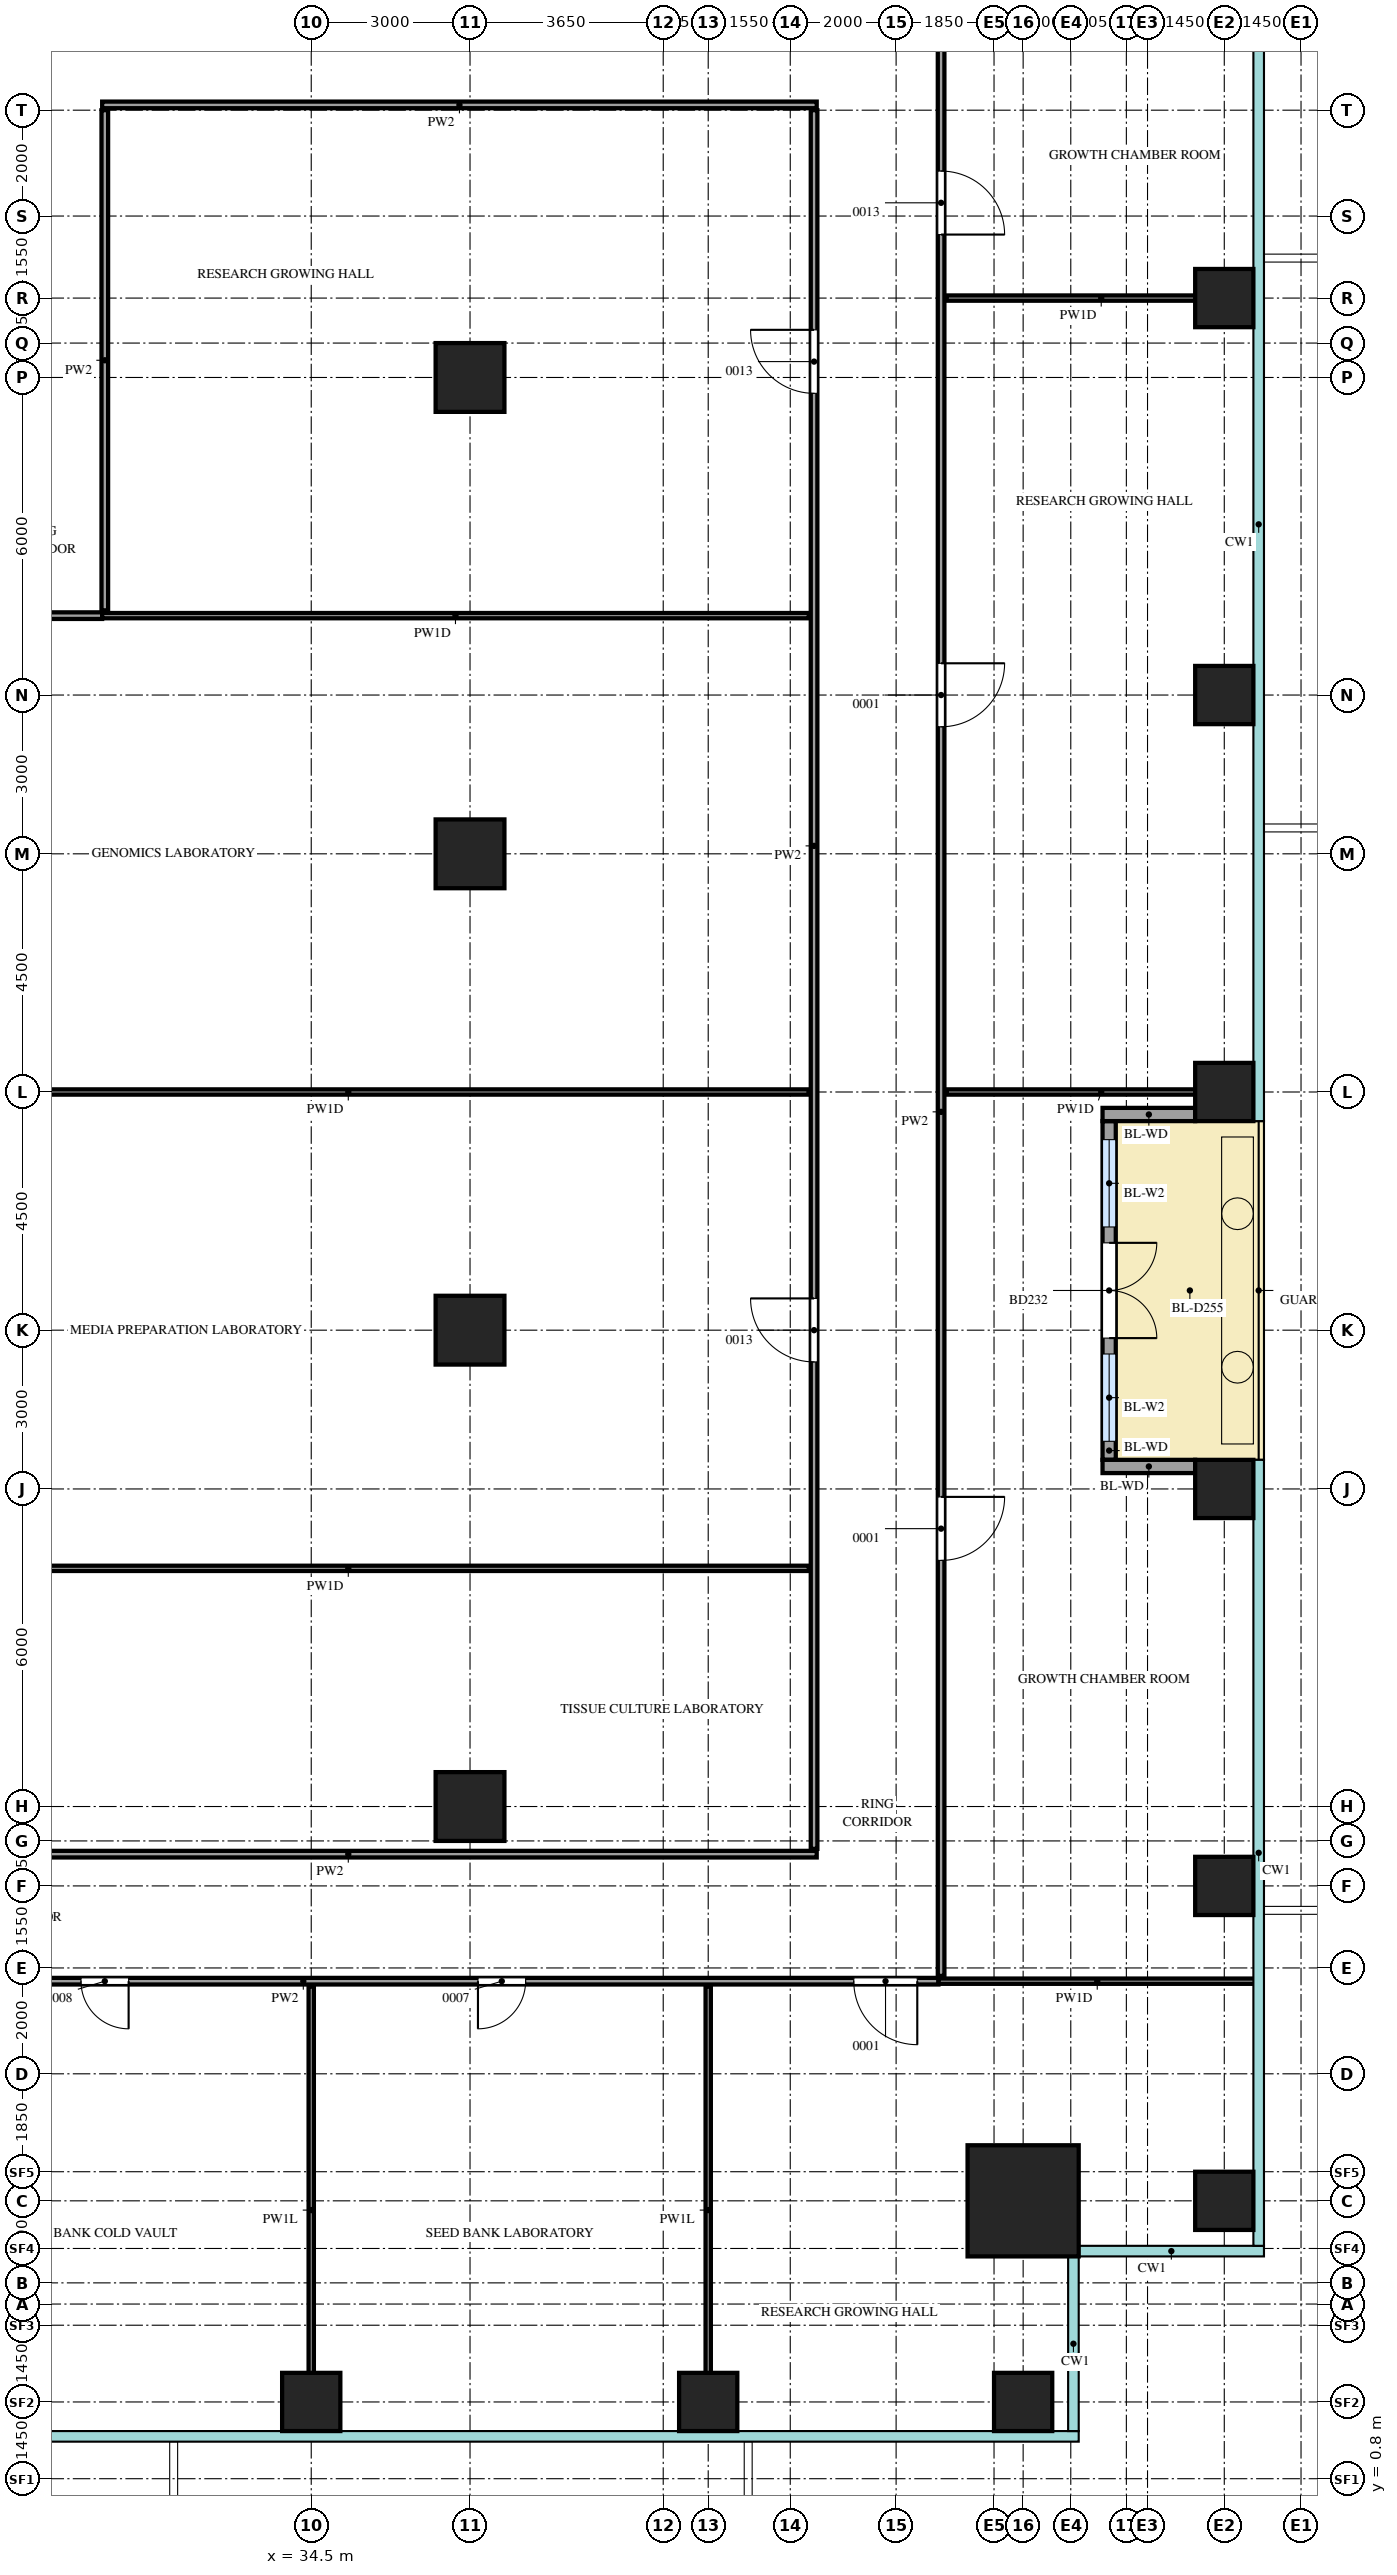
"""IFC4 building model, lengths in metres.
Left out: names, types, materials, properties, quantities, classifications, styles, units other than length and angle.
Written with IfcOpenShell. Run it as: python <this file> out.ifc"""

import sys

from ifc_helpers import new_model, si_unit, direction, frame, frame_2d, origin, origin_2d, place, context, subcontext, project, spatial, rectangle, extrude, source, transform, mapped, element, fill, save


model = new_model("IFC4")
c1 = context("Model", 3, precision=1e-05, world=origin(), true_north=direction((0.0, 1.0)))
c2 = subcontext(c1, "Body", "Model", "MODEL_VIEW")
j1 = project(units=[si_unit("LENGTHUNIT", "METRE"), si_unit("PLANEANGLEUNIT", "RADIAN")], contexts=[c1])
p1 = place(None, origin())
s1 = spatial("IfcSite", under=j1, at=p1, CompositionType="ELEMENT")
p2 = place(p1, origin())
s2 = spatial("IfcBuilding", under=s1, at=p2, CompositionType="ELEMENT")
p3 = place(p2, frame((0.0, 0.0, 110.3)))
s3 = spatial("IfcBuildingStorey", under=s2, at=p3, CompositionType="ELEMENT", Elevation=110.3)
m1 = source(origin(), c2, "Body", "SweptSolid", [
    extrude(rectangle(XDim=2.1, YDim=2.1, at=origin_2d()), origin(), (0.0, 0.0, 1.0), 4.4),
])
p4 = place(p3, frame((47.95, 6.05, 0.0), z_axis=(0.0, 0.0, 1.0), x_axis=(1.0, 0.0, 0.0)))
e1 = element("IfcColumn", 1, at=p4, inside=s3, PredefinedType="COLUMN", context=c2, shape_type="MappedRepresentation", body=[
    mapped(m1, transform((0.0, 0.0, 0.0))),
])
m2 = source(origin(), c2, "Body", "SweptSolid", [
    extrude(rectangle(XDim=1.1, YDim=1.1, at=origin_2d()), origin(), (0.0, 0.0, 1.0), 4.1),
])
for number, where, z_axis, x_axis in (
    (2, (34.5, 2.25, 0.0), (0.0, 0.0, 1.0), (1.0, 0.0, 0.0)),
    (3, (42.0, 2.25, 0.0), (0.0, 0.0, 1.0), (1.0, 0.0, 0.0)),
    (4, (47.95, 2.25, 0.0), (0.0, 0.0, 1.0), (1.0, 0.0, 0.0)),
    (5, (51.75, 6.05, 0.0), (0.0, 0.0, 1.0), (1.0, 0.0, 0.0)),
    (6, (51.75, 12.0, 0.0), (0.0, 0.0, 1.0), (1.0, 0.0, 0.0)),
    (7, (51.75, 19.5, 0.0), (0.0, 0.0, 1.0), (1.0, 0.0, 0.0)),
    (8, (51.75, 27.0, 0.0), (0.0, 0.0, 1.0), (1.0, 0.0, 0.0)),
    (9, (51.75, 34.5, 0.0), (0.0, 0.0, 1.0), (1.0, 0.0, 0.0)),
    (10, (51.75, 42.0, 0.0), (0.0, 0.0, 1.0), (1.0, 0.0, 0.0)),
):
    element("IfcColumn", number, at=place(p3, frame(where, z_axis=z_axis, x_axis=x_axis)), inside=s3, PredefinedType="COLUMN", context=c2, shape_type="MappedRepresentation", body=[
        mapped(m2, transform((0.0, 0.0, 0.0))),
    ])
m3 = source(origin(), c2, "Body", "SweptSolid", [
    extrude(rectangle(XDim=1.3, YDim=1.3, at=origin_2d()), origin(), (0.0, 0.0, 1.0), 4.1),
])
for number, where, z_axis, x_axis in (
    (11, (37.5, 13.5, 0.0), (0.0, 0.0, 1.0), (1.0, 0.0, 0.0)),
    (12, (37.5, 22.5, 0.0), (0.0, 0.0, 1.0), (1.0, 0.0, 0.0)),
    (13, (37.5, 31.5, 0.0), (0.0, 0.0, 1.0), (1.0, 0.0, 0.0)),
    (14, (37.5, 40.5, 0.0), (0.0, 0.0, 1.0), (1.0, 0.0, 0.0)),
):
    element("IfcColumn", number, at=place(p3, frame(where, z_axis=z_axis, x_axis=x_axis)), inside=s3, PredefinedType="COLUMN", context=c2, shape_type="MappedRepresentation", body=[
        mapped(m3, transform((0.0, 0.0, 0.0))),
    ])
m4 = source(origin(), c2, "Body", "SweptSolid", [
    extrude(rectangle(XDim=6.4, YDim=0.25, at=frame_2d((3.2, 0.0))), origin(), (0.0, 0.0, 1.0), 3.55),
])
p5 = place(p3, frame((49.575, 20.05, 0.0), z_axis=(0.0, 0.0, 1.0), x_axis=(0.0, 1.0, 0.0)))
e15 = element("IfcWall", 15, at=p5, inside=s3, PredefinedType="SOLIDWALL", context=c2, shape_type="MappedRepresentation", body=[
    mapped(m4, transform((0.0, 0.0, 0.0))),
])
m5 = source(origin(), c2, "Body", "SweptSolid", [
    extrude(rectangle(XDim=1.65, YDim=2.4, at=frame_2d((0.825, 1.2))), frame((0.0, 0.135, 0.0), z_axis=(0.0, -1.0, 0.0), x_axis=(1.0, 0.0, 0.0)), (0.0, 0.0, 1.0), 0.27),
])
p6 = place(p5, frame((0.35, 0.0, 0.0)))
e16 = element("IfcOpeningElement", 16, at=p6, cuts=e15, PredefinedType="OPENING", context=c2, shape_type="MappedRepresentation", body=[
    mapped(m5, transform((0.0, 0.0, 0.0))),
])
p7 = place(p5, frame((4.4, 0.0, 0.0)))
e17 = element("IfcOpeningElement", 17, at=p7, cuts=e15, PredefinedType="OPENING", context=c2, shape_type="MappedRepresentation", body=[
    mapped(m5, transform((0.0, 0.0, 0.0))),
])
m6 = source(origin(), c2, "Body", "SweptSolid", [
    extrude(rectangle(XDim=1.8, YDim=2.4, at=frame_2d((0.9, 1.2))), frame((0.0, 0.135, 0.0), z_axis=(0.0, -1.0, 0.0), x_axis=(1.0, 0.0, 0.0)), (0.0, 0.0, 1.0), 0.27),
])
p8 = place(p5, frame((2.3, 0.0, 0.0)))
e18 = element("IfcOpeningElement", 18, at=p8, cuts=e15, PredefinedType="OPENING", context=c2, shape_type="MappedRepresentation", body=[
    mapped(m6, transform((0.0, 0.0, 0.0))),
])
m7 = source(origin(), c2, "Body", "SweptSolid", [
    extrude(rectangle(XDim=1.75, YDim=0.25, at=frame_2d((0.875, 0.0))), origin(), (0.0, 0.0, 1.0), 3.55),
])
for number, where, z_axis, x_axis in (
    (19, (51.2, 19.925, 0.0), (0.0, 0.0, 1.0), (-1.0, 0.0, 0.0)),
    (20, (51.2, 26.575, 0.0), (0.0, 0.0, 1.0), (-1.0, 0.0, 0.0)),
):
    element("IfcWall", number, at=place(p3, frame(where, z_axis=z_axis, x_axis=x_axis)), inside=s3, PredefinedType="SOLIDWALL", context=c2, shape_type="MappedRepresentation", body=[
        mapped(m7, transform((0.0, 0.0, 0.0))),
    ])
m8 = source(origin(), c2, "Body", "SweptSolid", [
    extrude(rectangle(XDim=8.45, YDim=0.1, at=frame_2d((4.225, 0.0))), origin(), (0.0, 0.0, 1.0), 3.6),
])
for number, where, z_axis, x_axis in (
    (21, (34.5, 1.65, 0.0), (0.0, 0.0, 1.0), (0.0, 1.0, 0.0)),
    (22, (42.0, 1.65, 0.0), (0.0, 0.0, 1.0), (0.0, 1.0, 0.0)),
):
    element("IfcWall", number, at=place(p3, frame(where, z_axis=z_axis, x_axis=x_axis)), inside=s3, PredefinedType="PARTITIONING", context=c2, shape_type="MappedRepresentation", body=[
        mapped(m8, transform((0.0, 0.0, 0.0))),
    ])
m9 = source(origin(), c2, "Body", "SweptSolid", [
    extrude(rectangle(XDim=20.0, YDim=0.125, at=frame_2d((10.0, 0.0))), origin(), (0.0, 0.0, 1.0), 4.2),
])
p9 = place(p3, frame((26.35, 10.2, 0.0), z_axis=(0.0, 0.0, 1.0), x_axis=(1.0, 0.0, 0.0)))
e23 = element("IfcWall", 23, at=p9, inside=s3, PredefinedType="PARTITIONING", context=c2, shape_type="MappedRepresentation", body=[
    mapped(m9, transform((0.0, 0.0, 0.0))),
])
m10 = source(origin(), c2, "Body", "SweptSolid", [
    extrude(rectangle(XDim=0.9, YDim=2.1, at=frame_2d((0.45, 1.05))), frame((0.0, 0.073, 0.0), z_axis=(0.0, -1.0, 0.0), x_axis=(1.0, 0.0, 0.0)), (0.0, 0.0, 1.0), 0.145),
])
p10 = place(p9, frame((3.8, 0.0, 0.0)))
e24 = element("IfcOpeningElement", 24, at=p10, cuts=e23, PredefinedType="OPENING", context=c2, shape_type="MappedRepresentation", body=[
    mapped(m10, transform((0.0, 0.0, 0.0))),
])
p11 = place(p9, frame((11.3, 0.0, 0.0)))
e25 = element("IfcOpeningElement", 25, at=p11, cuts=e23, PredefinedType="OPENING", context=c2, shape_type="MappedRepresentation", body=[
    mapped(m10, transform((0.0, 0.0, 0.0))),
])
m11 = source(origin(), c2, "Body", "SweptSolid", [
    extrude(rectangle(XDim=1.2, YDim=2.1, at=frame_2d((0.6, 1.05))), frame((0.0, 0.073, 0.0), z_axis=(0.0, -1.0, 0.0), x_axis=(1.0, 0.0, 0.0)), (0.0, 0.0, 1.0), 0.145),
])
p12 = place(p9, frame((18.4, 0.0, 0.0)))
e26 = element("IfcOpeningElement", 26, at=p12, cuts=e23, PredefinedType="OPENING", context=c2, shape_type="MappedRepresentation", body=[
    mapped(m11, transform((0.0, 0.0, 0.0))),
])
m12 = source(origin(), c2, "Body", "SweptSolid", [
    extrude(rectangle(XDim=6.0, YDim=0.1, at=frame_2d((3.0, 0.0))), origin(), (0.0, 0.0, 1.0), 4.2),
])
p13 = place(p3, frame((46.35, 10.2, 0.0), z_axis=(0.0, 0.0, 1.0), x_axis=(1.0, 0.0, 0.0)))
e27 = element("IfcWall", 27, at=p13, inside=s3, PredefinedType="PARTITIONING", context=c2, shape_type="MappedRepresentation", body=[
    mapped(m12, transform((0.0, 0.0, 0.0))),
])
m13 = source(origin(), c2, "Body", "SweptSolid", [
    extrude(rectangle(XDim=37.65, YDim=0.125, at=frame_2d((18.825, 0.0))), origin(), (0.0, 0.0, 1.0), 4.2),
])
p14 = place(p3, frame((46.4, 10.3, 0.0), z_axis=(0.0, 0.0, 1.0), x_axis=(0.0, 1.0, 0.0)))
e28 = element("IfcWall", 28, at=p14, inside=s3, PredefinedType="PARTITIONING", context=c2, shape_type="MappedRepresentation", body=[
    mapped(m13, transform((0.0, 0.0, 0.0))),
])
p15 = place(p14, frame((7.85, 0.0, 0.0)))
e29 = element("IfcOpeningElement", 29, at=p15, cuts=e28, PredefinedType="OPENING", context=c2, shape_type="MappedRepresentation", body=[
    mapped(m11, transform((0.0, 0.0, 0.0))),
])
p16 = place(p14, frame((23.6, 0.0, 0.0)))
e30 = element("IfcOpeningElement", 30, at=p16, cuts=e28, PredefinedType="OPENING", context=c2, shape_type="MappedRepresentation", body=[
    mapped(m11, transform((0.0, 0.0, 0.0))),
])
p17 = place(p14, frame((32.9, 0.0, 0.0)))
e31 = element("IfcOpeningElement", 31, at=p17, cuts=e28, PredefinedType="OPENING", context=c2, shape_type="MappedRepresentation", body=[
    mapped(m11, transform((0.0, 0.0, 0.0))),
])
m14 = source(origin(), c2, "Body", "SweptSolid", [
    extrude(rectangle(XDim=17.7, YDim=0.125, at=frame_2d((8.85, 0.0))), origin(), (0.0, 0.0, 1.0), 4.2),
])
p18 = place(p3, frame((26.35, 12.6, 0.0), z_axis=(0.0, 0.0, 1.0), x_axis=(1.0, 0.0, 0.0)))
e32 = element("IfcWall", 32, at=p18, inside=s3, PredefinedType="PARTITIONING", context=c2, shape_type="MappedRepresentation", body=[
    mapped(m14, transform((0.0, 0.0, 0.0))),
])
m15 = source(origin(), c2, "Body", "SweptSolid", [
    extrude(rectangle(XDim=32.85, YDim=0.125, at=frame_2d((16.425, 0.0))), origin(), (0.0, 0.0, 1.0), 4.2),
])
p19 = place(p3, frame((44.0, 12.7, 0.0), z_axis=(0.0, 0.0, 1.0), x_axis=(0.0, 1.0, 0.0)))
e33 = element("IfcWall", 33, at=p19, inside=s3, PredefinedType="PARTITIONING", context=c2, shape_type="MappedRepresentation", body=[
    mapped(m15, transform((0.0, 0.0, 0.0))),
])
p20 = place(p19, frame((9.2, 0.0, 0.0)))
e34 = element("IfcOpeningElement", 34, at=p20, cuts=e33, PredefinedType="OPENING", context=c2, shape_type="MappedRepresentation", body=[
    mapped(m11, transform((0.0, 0.0, 0.0))),
])
p21 = place(p19, frame((27.5, 0.0, 0.0)))
e35 = element("IfcOpeningElement", 35, at=p21, cuts=e33, PredefinedType="OPENING", context=c2, shape_type="MappedRepresentation", body=[
    mapped(m11, transform((0.0, 0.0, 0.0))),
])
m16 = source(origin(), c2, "Body", "SweptSolid", [
    extrude(rectangle(XDim=17.4, YDim=0.1, at=frame_2d((8.7, 0.0))), origin(), (0.0, 0.0, 1.0), 4.2),
])
for number, where, z_axis, x_axis in (
    (36, (26.5, 18.0, 0.0), (0.0, 0.0, 1.0), (1.0, 0.0, 0.0)),
    (37, (26.5, 27.0, 0.0), (0.0, 0.0, 1.0), (1.0, 0.0, 0.0)),
):
    element("IfcWall", number, at=place(p3, frame(where, z_axis=z_axis, x_axis=x_axis)), inside=s3, PredefinedType="PARTITIONING", context=c2, shape_type="MappedRepresentation", body=[
        mapped(m16, transform((0.0, 0.0, 0.0))),
    ])
m17 = source(origin(), c2, "Body", "SweptSolid", [
    extrude(rectangle(XDim=5.85, YDim=0.1, at=frame_2d((2.925, 0.0))), origin(), (0.0, 0.0, 1.0), 4.2),
])
p22 = place(p3, frame((46.5, 27.0, 0.0), z_axis=(0.0, 0.0, 1.0), x_axis=(1.0, 0.0, 0.0)))
e38 = element("IfcWall", 38, at=p22, inside=s3, PredefinedType="PARTITIONING", context=c2, shape_type="MappedRepresentation", body=[
    mapped(m17, transform((0.0, 0.0, 0.0))),
])
m18 = source(origin(), c2, "Body", "SweptSolid", [
    extrude(rectangle(XDim=4.2, YDim=0.125, at=frame_2d((2.1, 0.0))), origin(), (0.0, 0.0, 1.0), 4.2),
])
p23 = place(p3, frame((26.35, 36.0, 0.0), z_axis=(0.0, 0.0, 1.0), x_axis=(1.0, 0.0, 0.0)))
e39 = element("IfcWall", 39, at=p23, inside=s3, PredefinedType="PARTITIONING", context=c2, shape_type="MappedRepresentation", body=[
    mapped(m18, transform((0.0, 0.0, 0.0))),
])
m19 = source(origin(), c2, "Body", "SweptSolid", [
    extrude(rectangle(XDim=13.35, YDim=0.1, at=frame_2d((6.675, 0.0))), origin(), (0.0, 0.0, 1.0), 4.2),
])
p24 = place(p3, frame((30.55, 36.0, 0.0), z_axis=(0.0, 0.0, 1.0), x_axis=(1.0, 0.0, 0.0)))
e40 = element("IfcWall", 40, at=p24, inside=s3, PredefinedType="PARTITIONING", context=c2, shape_type="MappedRepresentation", body=[
    mapped(m19, transform((0.0, 0.0, 0.0))),
])
m20 = source(origin(), c2, "Body", "SweptSolid", [
    extrude(rectangle(XDim=9.45, YDim=0.125, at=frame_2d((4.725, 0.0))), origin(), (0.0, 0.0, 1.0), 4.2),
])
p25 = place(p3, frame((30.6, 36.1, 0.0), z_axis=(0.0, 0.0, 1.0), x_axis=(0.0, 1.0, 0.0)))
e41 = element("IfcWall", 41, at=p25, inside=s3, PredefinedType="PARTITIONING", context=c2, shape_type="MappedRepresentation", body=[
    mapped(m20, transform((0.0, 0.0, 0.0))),
])
p26 = place(p3, frame((46.5, 42.0, 0.0), z_axis=(0.0, 0.0, 1.0), x_axis=(1.0, 0.0, 0.0)))
e42 = element("IfcWall", 42, at=p26, inside=s3, PredefinedType="PARTITIONING", context=c2, shape_type="MappedRepresentation", body=[
    mapped(m17, transform((0.0, 0.0, 0.0))),
])
m21 = source(origin(), c2, "Body", "SweptSolid", [
    extrude(rectangle(XDim=13.5, YDim=0.125, at=frame_2d((6.75, 0.0))), origin(), (0.0, 0.0, 1.0), 4.2),
])
p27 = place(p3, frame((30.55, 45.65, 0.0), z_axis=(0.0, 0.0, 1.0), x_axis=(1.0, 0.0, 0.0)))
e43 = element("IfcWall", 43, at=p27, inside=s3, PredefinedType="PARTITIONING", context=c2, shape_type="MappedRepresentation", body=[
    mapped(m21, transform((0.0, 0.0, 0.0))),
])
m22 = source(origin(), c2, "Body", "SweptSolid", [
    extrude(rectangle(XDim=1.65, YDim=2.4, at=frame_2d((0.825, 1.2))), frame((0.0, 0.03, 0.0), z_axis=(0.0, -1.0, 0.0), x_axis=(1.0, 0.0, 0.0)), (0.0, 0.0, 1.0), 0.06),
])
p28 = place(p6, origin())
e44 = element("IfcWindow", 44, at=p28, inside=s3, PartitioningType="SINGLE_PANEL", PredefinedType="WINDOW", context=c2, shape_type="MappedRepresentation", body=[
    mapped(m22, transform((0.0, 0.0, 0.0))),
])
fill(e16, e44)
p29 = place(p7, origin())
e45 = element("IfcWindow", 45, at=p29, inside=s3, PartitioningType="SINGLE_PANEL", PredefinedType="WINDOW", context=c2, shape_type="MappedRepresentation", body=[
    mapped(m22, transform((0.0, 0.0, 0.0))),
])
fill(e17, e45)
m23 = source(origin(), c2, "Body", "SweptSolid", [
    extrude(rectangle(XDim=1.8, YDim=2.4, at=frame_2d((0.9, 1.2))), frame((0.0, 0.025, 0.0), z_axis=(0.0, -1.0, 0.0), x_axis=(1.0, 0.0, 0.0)), (0.0, 0.0, 1.0), 0.05),
])
p30 = place(p8, origin())
e46 = element("IfcDoor", 46, at=p30, inside=s3, OperationType="DOUBLE_DOOR_DOUBLE_SWING", PredefinedType="DOOR", context=c2, shape_type="MappedRepresentation", body=[
    mapped(m23, transform((0.0, 0.0, 0.0))),
])
fill(e18, e46)
m24 = source(origin(), c2, "Body", "SweptSolid", [
    extrude(rectangle(XDim=0.9, YDim=2.1, at=frame_2d((0.45, 1.05))), frame((0.0, 0.025, 0.0), z_axis=(0.0, -1.0, 0.0), x_axis=(1.0, 0.0, 0.0)), (0.0, 0.0, 1.0), 0.05),
])
p31 = place(p10, origin())
e47 = element("IfcDoor", 47, at=p31, inside=s3, OperationType="SINGLE_SWING_RIGHT", PredefinedType="DOOR", context=c2, shape_type="MappedRepresentation", body=[
    mapped(m24, transform((0.0, 0.0, 0.0))),
])
fill(e24, e47)
p32 = place(p11, origin())
e48 = element("IfcDoor", 48, at=p32, inside=s3, OperationType="SINGLE_SWING_LEFT", PredefinedType="DOOR", context=c2, shape_type="MappedRepresentation", body=[
    mapped(m24, transform((0.0, 0.0, 0.0))),
])
fill(e25, e48)
m25 = source(origin(), c2, "Body", "SweptSolid", [
    extrude(rectangle(XDim=1.2, YDim=2.1, at=frame_2d((0.6, 1.05))), frame((0.0, 0.025, 0.0), z_axis=(0.0, -1.0, 0.0), x_axis=(1.0, 0.0, 0.0)), (0.0, 0.0, 1.0), 0.05),
])
p33 = place(p12, origin())
e49 = element("IfcDoor", 49, at=p33, inside=s3, OperationType="SINGLE_SWING_RIGHT", PredefinedType="DOOR", context=c2, shape_type="MappedRepresentation", body=[
    mapped(m25, transform((0.0, 0.0, 0.0))),
])
fill(e26, e49)
p34 = place(p20, origin())
e50 = element("IfcDoor", 50, at=p34, inside=s3, OperationType="SINGLE_SWING_LEFT", PredefinedType="DOOR", context=c2, shape_type="MappedRepresentation", body=[
    mapped(m25, transform((0.0, 0.0, 0.0))),
])
fill(e34, e50)
p35 = place(p21, origin())
e51 = element("IfcDoor", 51, at=p35, inside=s3, OperationType="SINGLE_SWING_LEFT", PredefinedType="DOOR", context=c2, shape_type="MappedRepresentation", body=[
    mapped(m25, transform((0.0, 0.0, 0.0))),
])
fill(e35, e51)
p36 = place(p15, origin())
e52 = element("IfcDoor", 52, at=p36, inside=s3, OperationType="SINGLE_SWING_RIGHT", PredefinedType="DOOR", context=c2, shape_type="MappedRepresentation", body=[
    mapped(m25, transform((0.0, 0.0, 0.0))),
])
fill(e29, e52)
p37 = place(p16, origin())
e53 = element("IfcDoor", 53, at=p37, inside=s3, OperationType="SINGLE_SWING_RIGHT", PredefinedType="DOOR", context=c2, shape_type="MappedRepresentation", body=[
    mapped(m25, transform((0.0, 0.0, 0.0))),
])
fill(e30, e53)
p38 = place(p17, origin())
e54 = element("IfcDoor", 54, at=p38, inside=s3, OperationType="SINGLE_SWING_LEFT", PredefinedType="DOOR", context=c2, shape_type="MappedRepresentation", body=[
    mapped(m25, transform((0.0, 0.0, 0.0))),
])
fill(e31, e54)
save(model, sys.argv[1])
